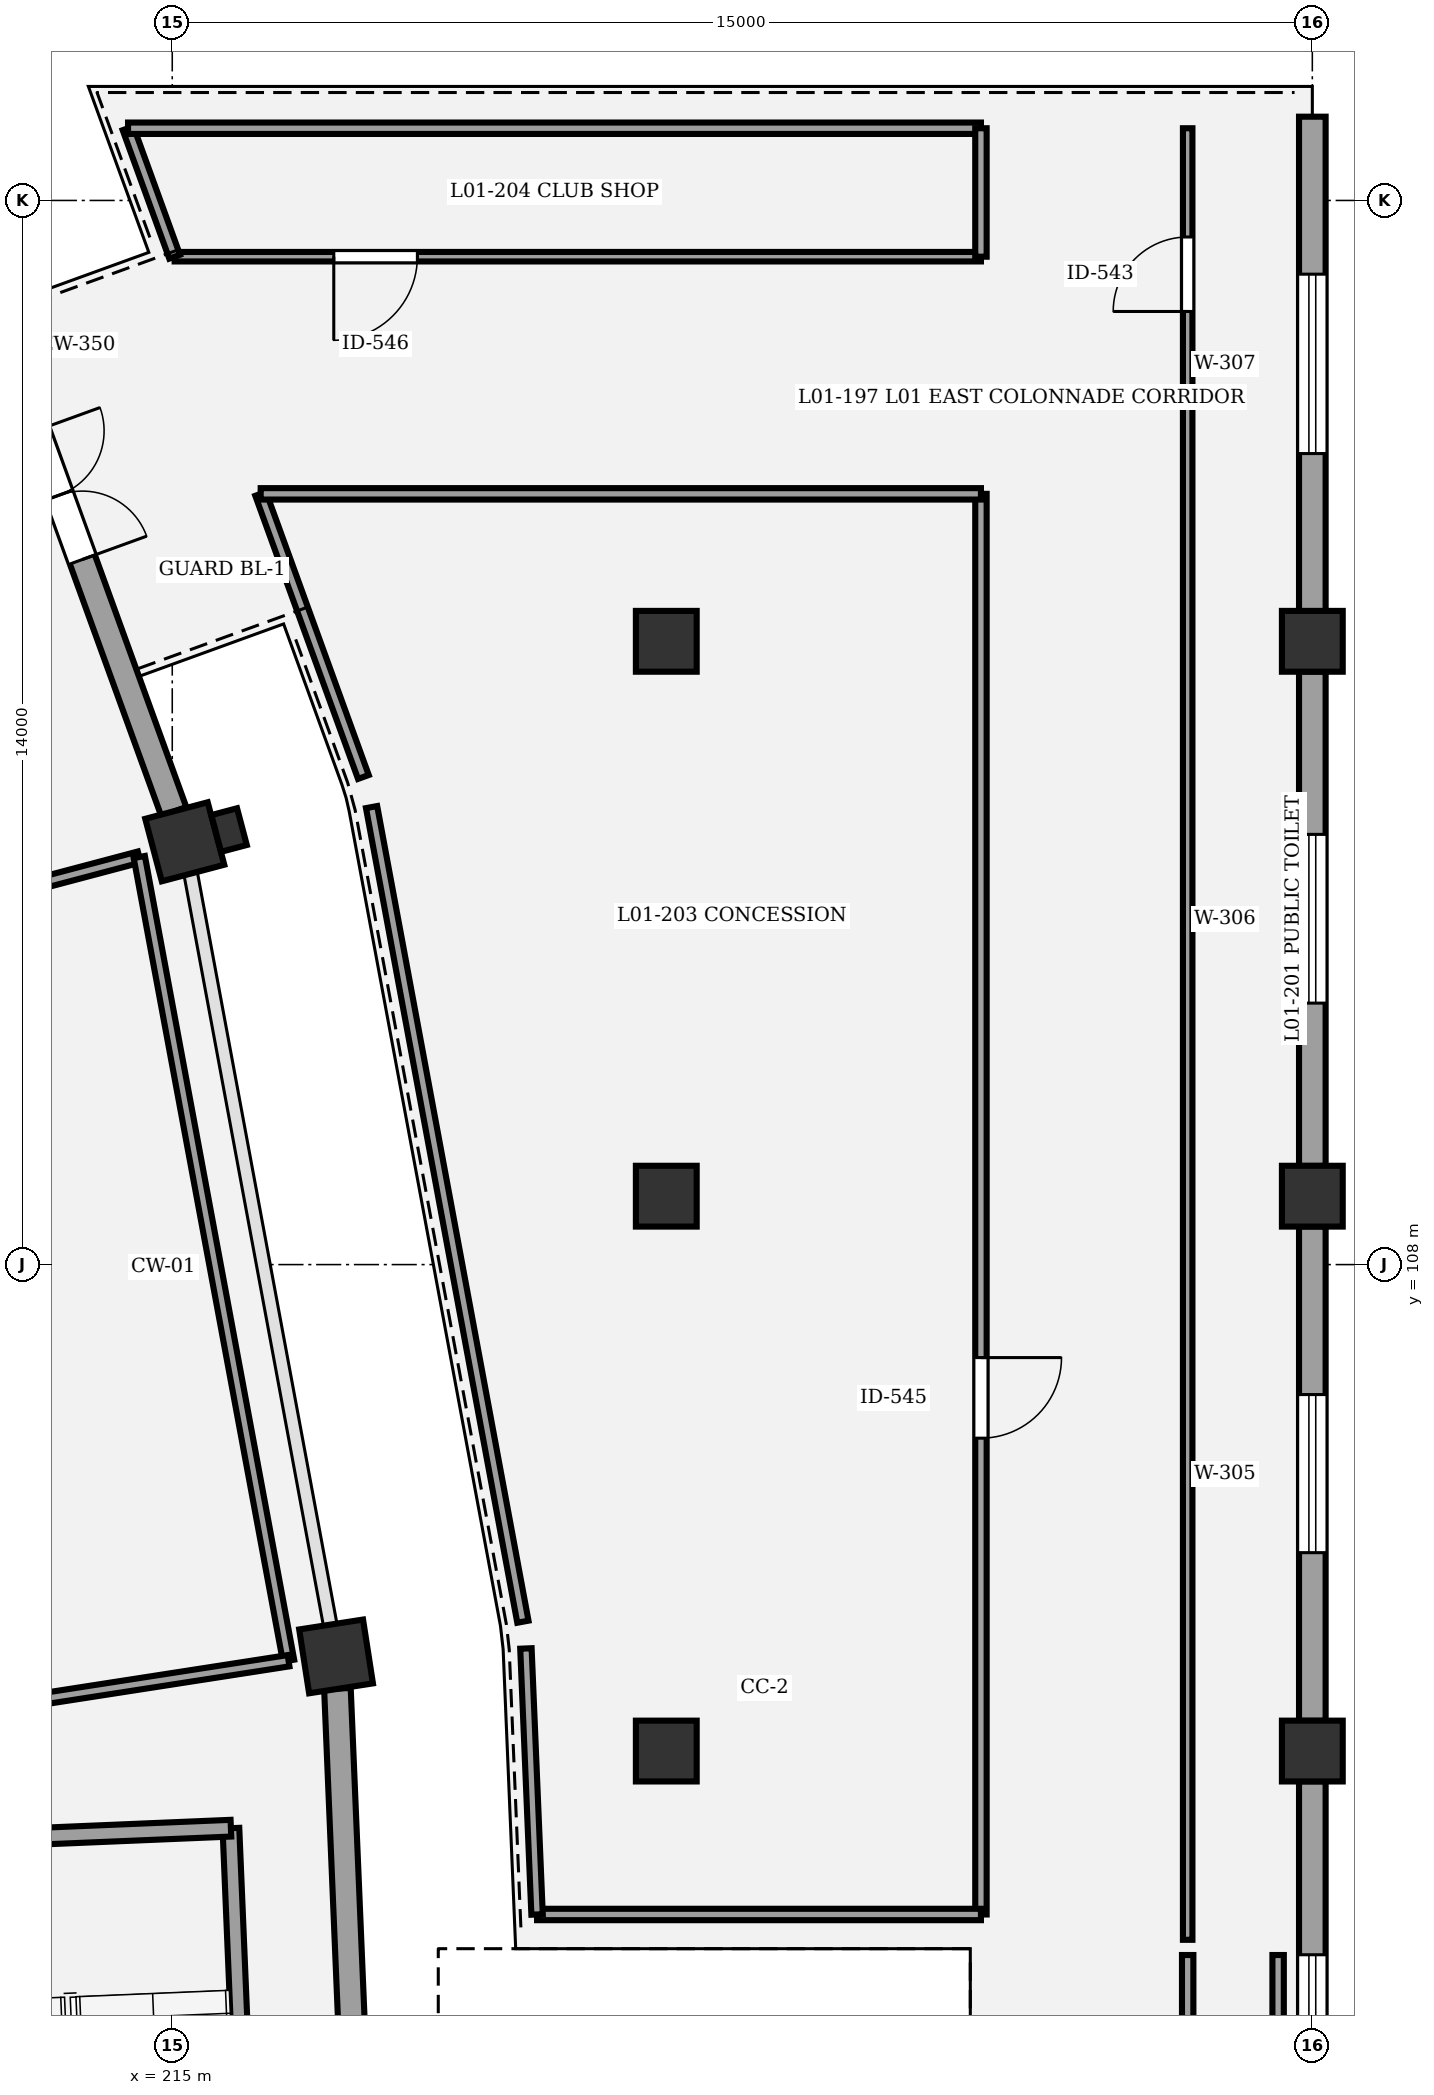
"""IFC4 building model, lengths in metres.
Left out: names, types, materials, properties, quantities, classifications, styles, units other than length and angle.
Written with IfcOpenShell. Run it as: python <this file> out.ifc"""

import sys

from ifc_helpers import new_model, si_unit, direction, frame, frame_2d, origin, origin_2d, place, context, subcontext, project, spatial, rectangle, circle, extrude, element, fill, save


model = new_model("IFC4")
c1 = context("Model", 3, precision=1e-05, world=origin(), true_north=direction((0.0, 1.0)))
c2 = subcontext(c1, "Body", "Model", "MODEL_VIEW")
j1 = project(units=[si_unit("LENGTHUNIT", "METRE"), si_unit("PLANEANGLEUNIT", "RADIAN")], contexts=[c1])
p1 = place(None, origin())
s1 = spatial("IfcSite", under=j1, at=p1, CompositionType="ELEMENT")
p2 = place(p1, origin())
s2 = spatial("IfcBuilding", under=s1, at=p2, CompositionType="ELEMENT")
p3 = place(p2, frame((0.0, 0.0, 5.4)))
s3 = spatial("IfcBuildingStorey", under=s2, at=p3, CompositionType="ELEMENT", Elevation=5.4)
for number, where, z_axis, x_axis in (
    (1, (217.156, 102.845, 0.0), (0.0, 0.0, 1.0), (0.988, 0.153, 0.0)),
    (2, (215.165, 113.562, 0.0), (0.0, 0.0, 1.0), (0.967, 0.256, 0.0)),
):
    element("IfcColumn", number, at=place(p3, frame(where, z_axis=z_axis, x_axis=x_axis)), inside=s3, PredefinedType="COLUMN", context=c2, shape_type="SweptSolid", body=[
        extrude(rectangle(XDim=0.85, YDim=0.85, at=origin_2d()), origin(), (0.0, 0.0, 1.0), 4.8),
    ])
p4 = place(p3, frame((215.748, 113.717, 0.0), z_axis=(0.0, 0.0, 1.0), x_axis=(-0.256289373133, 0.966600102017, 0.0)))
e3 = element("IfcColumn", 3, at=p4, inside=s3, PredefinedType="PILASTER", context=c2, shape_type="SweptSolid", body=[
    extrude(rectangle(XDim=0.5, YDim=0.35, at=origin_2d()), origin(), (0.0, 0.0, 1.0), 4.8),
])
for number, where, z_axis, x_axis in (
    (4, (221.5, 101.6, 0.0), (0.0, 0.0, 1.0), (1.0, 0.0, 0.0)),
    (5, (221.5, 108.9, 0.0), (0.0, 0.0, 1.0), (1.0, 0.0, 0.0)),
    (6, (221.5, 116.2, 0.0), (0.0, 0.0, 1.0), (1.0, 0.0, 0.0)),
    (7, (230.0, 101.6, 0.0), (0.0, 0.0, 1.0), (1.0, 0.0, 0.0)),
    (8, (230.0, 108.9, 0.0), (0.0, 0.0, 1.0), (1.0, 0.0, 0.0)),
    (9, (230.0, 116.2, 0.0), (0.0, 0.0, 1.0), (1.0, 0.0, 0.0)),
):
    element("IfcColumn", number, at=place(p3, frame(where, z_axis=z_axis, x_axis=x_axis)), inside=s3, PredefinedType="COLUMN", context=c2, shape_type="SweptSolid", body=[
        extrude(circle(Radius=0.4, at=origin_2d()), origin(), (0.0, 0.0, 1.0), 4.8),
    ])
p5 = place(p3, frame((217.802, 87.423, 0.0), z_axis=(0.0, 0.0, 1.0), x_axis=(-0.041907194538, 0.999121507649, 0.0)))
e10 = element("IfcWall", 10, at=p5, inside=s3, PredefinedType="STANDARD", context=c2, shape_type="SweptSolid", body=[
    extrude(rectangle(XDim=15.013, YDim=0.35, at=frame_2d((7.506, 0.0))), origin(), (0.0, 0.0, 1.0), 3.57),
])
p6 = place(p5, frame((6.247, 0.0, 0.9)))
e11 = element("IfcOpeningElement", 11, at=p6, cuts=e10, PredefinedType="OPENING", context=c2, shape_type="SweptSolid", body=[
    extrude(rectangle(XDim=2.52, YDim=1.55, at=frame_2d((1.26, 0.775))), frame((0.0, 0.185, 0.0), z_axis=(0.0, -1.0, 0.0), x_axis=(1.0, 0.0, 0.0)), (0.0, 0.0, 1.0), 0.37),
])
p7 = place(p3, frame((212.0, 122.285, 0.0), z_axis=(0.0, 0.0, 1.0), x_axis=(0.341014666885, -0.940057975324, 0.0)))
e12 = element("IfcWall", 12, at=p7, inside=s3, PredefinedType="STANDARD", context=c2, shape_type="SweptSolid", body=[
    extrude(rectangle(XDim=8.855, YDim=0.35, at=frame_2d((4.428, 0.0))), origin(), (0.0, 0.0, 1.0), 3.57),
])
p8 = place(p7, frame((3.528, 0.0, 0.0)))
e13 = element("IfcOpeningElement", 13, at=p8, cuts=e12, PredefinedType="OPENING", context=c2, shape_type="SweptSolid", body=[
    extrude(rectangle(XDim=1.8, YDim=2.4, at=frame_2d((0.9, 1.2))), frame((0.0, 0.185, 0.0), z_axis=(0.0, -1.0, 0.0), x_axis=(1.0, 0.0, 0.0)), (0.0, 0.0, 1.0), 0.37),
])
p9 = place(p3, frame((230.0, 101.202, 0.0), z_axis=(0.0, 0.0, 1.0), x_axis=(0.0, -1.0, 0.0)))
e14 = element("IfcWall", 14, at=p9, inside=s3, PredefinedType="STANDARD", context=c2, shape_type="SweptSolid", body=[
    extrude(rectangle(XDim=6.504, YDim=0.35, at=frame_2d((3.252, 0.0))), origin(), (0.0, 0.0, 1.0), 3.56),
])
p10 = place(p9, frame((2.282, 0.0, 0.9)))
e15 = element("IfcOpeningElement", 15, at=p10, cuts=e14, PredefinedType="OPENING", context=c2, shape_type="SweptSolid", body=[
    extrude(rectangle(XDim=1.94, YDim=2.15, at=frame_2d((0.97, 1.075))), frame((0.0, 0.185, 0.0), z_axis=(0.0, -1.0, 0.0), x_axis=(1.0, 0.0, 0.0)), (0.0, 0.0, 1.0), 0.37),
])
p11 = place(p3, frame((230.0, 108.502, 0.0), z_axis=(0.0, 0.0, 1.0), x_axis=(0.0, -1.0, 0.0)))
e16 = element("IfcWall", 16, at=p11, inside=s3, PredefinedType="STANDARD", context=c2, shape_type="SweptSolid", body=[
    extrude(rectangle(XDim=6.504, YDim=0.35, at=frame_2d((3.252, 0.0))), origin(), (0.0, 0.0, 1.0), 3.56),
])
p12 = place(p11, frame((2.212, 0.0, 0.9)))
e17 = element("IfcOpeningElement", 17, at=p12, cuts=e16, PredefinedType="OPENING", context=c2, shape_type="SweptSolid", body=[
    extrude(rectangle(XDim=2.08, YDim=2.15, at=frame_2d((1.04, 1.075))), frame((0.0, 0.185, 0.0), z_axis=(0.0, -1.0, 0.0), x_axis=(1.0, 0.0, 0.0)), (0.0, 0.0, 1.0), 0.37),
])
p13 = place(p3, frame((230.0, 115.802, 0.0), z_axis=(0.0, 0.0, 1.0), x_axis=(0.0, -1.0, 0.0)))
e18 = element("IfcWall", 18, at=p13, inside=s3, PredefinedType="STANDARD", context=c2, shape_type="SweptSolid", body=[
    extrude(rectangle(XDim=6.504, YDim=0.35, at=frame_2d((3.252, 0.0))), origin(), (0.0, 0.0, 1.0), 3.56),
])
p14 = place(p13, frame((2.142, 0.0, 0.9)))
e19 = element("IfcOpeningElement", 19, at=p14, cuts=e18, PredefinedType="OPENING", context=c2, shape_type="SweptSolid", body=[
    extrude(rectangle(XDim=2.22, YDim=2.15, at=frame_2d((1.11, 1.075))), frame((0.0, 0.185, 0.0), z_axis=(0.0, -1.0, 0.0), x_axis=(1.0, 0.0, 0.0)), (0.0, 0.0, 1.0), 0.37),
])
p15 = place(p3, frame((230.0, 123.102, 0.0), z_axis=(0.0, 0.0, 1.0), x_axis=(0.0, -1.0, 0.0)))
e20 = element("IfcWall", 20, at=p15, inside=s3, PredefinedType="STANDARD", context=c2, shape_type="SweptSolid", body=[
    extrude(rectangle(XDim=6.504, YDim=0.35, at=frame_2d((3.252, 0.0))), origin(), (0.0, 0.0, 1.0), 3.56),
])
p16 = place(p15, frame((2.072, 0.0, 0.9)))
e21 = element("IfcOpeningElement", 21, at=p16, cuts=e20, PredefinedType="OPENING", context=c2, shape_type="SweptSolid", body=[
    extrude(rectangle(XDim=2.36, YDim=2.15, at=frame_2d((1.18, 1.075))), frame((0.0, 0.185, 0.0), z_axis=(0.0, -1.0, 0.0), x_axis=(1.0, 0.0, 0.0)), (0.0, 0.0, 1.0), 0.37),
])
p17 = place(p3, frame((215.772, 100.585, 0.0), z_axis=(0.0, 0.0, 1.0), x_axis=(0.041871977473, -0.999122984173, 0.0)))
e22 = element("IfcWall", 22, at=p17, inside=s3, PredefinedType="SHEAR", context=c2, shape_type="SweptSolid", body=[
    extrude(rectangle(XDim=11.02, YDim=0.22, at=frame_2d((5.51, 0.0))), origin(), (0.0, 0.0, 1.0), 4.55),
])
p18 = place(p3, frame((211.365, 100.4, 0.0), z_axis=(0.0, 0.0, 1.0), x_axis=(0.999121521721, 0.041906859039, 0.0)))
e23 = element("IfcWall", 23, at=p18, inside=s3, PredefinedType="SHEAR", context=c2, shape_type="SweptSolid", body=[
    extrude(rectangle(XDim=4.41, YDim=0.22, at=frame_2d((2.205, 0.0))), origin(), (0.0, 0.0, 1.0), 4.55),
])
p19 = place(p3, frame((228.36, 75.083, 0.0), z_axis=(0.0, 0.0, 1.0), x_axis=(0.0, 1.0, 0.0)))
e24 = element("IfcWall", 24, at=p19, inside=s3, PredefinedType="PARTITIONING", context=c2, shape_type="SweptSolid", body=[
    extrude(rectangle(XDim=23.833, YDim=0.15, at=frame_2d((11.917, 0.0))), origin(), (0.0, 0.0, 1.0), 3.55),
])
p20 = place(p19, frame((8.109, 0.0, 0.0)))
e25 = element("IfcOpeningElement", 25, at=p20, cuts=e24, PredefinedType="OPENING", context=c2, shape_type="SweptSolid", body=[
    extrude(rectangle(XDim=0.94, YDim=2.1, at=frame_2d((0.47, 1.05))), frame((0.0, 0.085, 0.0), z_axis=(0.0, -1.0, 0.0), x_axis=(1.0, 0.0, 0.0)), (0.0, 0.0, 1.0), 0.17),
])
p21 = place(p3, frame((228.36, 99.117, 0.0), z_axis=(0.0, 0.0, 1.0), x_axis=(0.0, 1.0, 0.0)))
e26 = element("IfcWall", 26, at=p21, inside=s3, PredefinedType="PARTITIONING", context=c2, shape_type="SweptSolid", body=[
    extrude(rectangle(XDim=23.833, YDim=0.125, at=frame_2d((11.917, 0.0))), origin(), (0.0, 0.0, 1.0), 3.55),
])
p22 = place(p21, frame((21.423, 0.0, 0.0)))
e27 = element("IfcOpeningElement", 27, at=p22, cuts=e26, PredefinedType="OPENING", context=c2, shape_type="SweptSolid", body=[
    extrude(rectangle(XDim=0.98, YDim=2.1, at=frame_2d((0.49, 1.05))), frame((0.0, 0.073, 0.0), z_axis=(0.0, -1.0, 0.0), x_axis=(1.0, 0.0, 0.0)), (0.0, 0.0, 1.0), 0.145),
])
p23 = place(p3, frame((225.64, 118.14, 0.0), z_axis=(0.0, 0.0, 1.0), x_axis=(0.0, -1.0, 0.0)))
e28 = element("IfcWall", 28, at=p23, inside=s3, PredefinedType="PARTITIONING", context=c2, shape_type="SweptSolid", body=[
    extrude(rectangle(XDim=18.69, YDim=0.15, at=frame_2d((9.345, 0.0))), origin(), (0.0, 0.0, 1.0), 3.55),
])
p24 = place(p23, frame((11.364, 0.0, 0.0)))
e29 = element("IfcOpeningElement", 29, at=p24, cuts=e28, PredefinedType="OPENING", context=c2, shape_type="SweptSolid", body=[
    extrude(rectangle(XDim=1.06, YDim=2.1, at=frame_2d((0.53, 1.05))), frame((0.0, 0.085, 0.0), z_axis=(0.0, -1.0, 0.0), x_axis=(1.0, 0.0, 0.0)), (0.0, 0.0, 1.0), 0.17),
])
p25 = place(p3, frame((225.64, 121.26, 0.0), z_axis=(0.0, 0.0, 1.0), x_axis=(-1.0, 0.0, 0.0)))
e30 = element("IfcWall", 30, at=p25, inside=s3, PredefinedType="PARTITIONING", context=c2, shape_type="SweptSolid", body=[
    extrude(rectangle(XDim=10.608, YDim=0.125, at=frame_2d((5.304, 0.0))), origin(), (0.0, 0.0, 1.0), 3.55),
])
p26 = place(p25, frame((7.415, 0.0, 0.0)))
e31 = element("IfcOpeningElement", 31, at=p26, cuts=e30, PredefinedType="OPENING", context=c2, shape_type="SweptSolid", body=[
    extrude(rectangle(XDim=1.1, YDim=2.1, at=frame_2d((0.55, 1.05))), frame((0.0, 0.073, 0.0), z_axis=(0.0, -1.0, 0.0), x_axis=(1.0, 0.0, 0.0)), (0.0, 0.0, 1.0), 0.145),
])
p27 = place(p3, frame((206.895, 111.328, 0.0), z_axis=(0.0, 0.0, 1.0), x_axis=(0.966593450181, 0.25631445934, 0.0)))
e32 = element("IfcWall", 32, at=p27, inside=s3, PredefinedType="PARTITIONING", context=c2, shape_type="SweptSolid", body=[
    extrude(rectangle(XDim=7.936, YDim=0.15, at=frame_2d((3.968, 0.0))), origin(), (0.0, 0.0, 1.0), 3.55),
])
p28 = place(p3, frame((214.566, 113.362, 0.0), z_axis=(0.0, 0.0, 1.0), x_axis=(0.182607868301, -0.983185824976, 0.0)))
e33 = element("IfcWall", 33, at=p28, inside=s3, PredefinedType="PARTITIONING", context=c2, shape_type="SweptSolid", body=[
    extrude(rectangle(XDim=10.755, YDim=0.15, at=frame_2d((5.377, 0.0))), origin(), (0.0, 0.0, 1.0), 3.55),
])
p29 = place(p3, frame((216.53, 102.789, 0.0), z_axis=(0.0, 0.0, 1.0), x_axis=(-0.988185582016, -0.153262048451, 0.0)))
e34 = element("IfcWall", 34, at=p29, inside=s3, PredefinedType="PARTITIONING", context=c2, shape_type="SweptSolid", body=[
    extrude(rectangle(XDim=7.917, YDim=0.15, at=frame_2d((3.958, 0.0))), origin(), (0.0, 0.0, 1.0), 3.55),
])
p30 = place(p3, frame((229.55, 98.917, 0.0), z_axis=(0.0, 0.0, 1.0), x_axis=(0.0, -1.0, 0.0)))
e35 = element("IfcWall", 35, at=p30, inside=s3, PredefinedType="PARTITIONING", context=c2, shape_type="SweptSolid", body=[
    extrude(rectangle(XDim=23.833, YDim=0.15, at=frame_2d((11.917, 0.0))), origin(), (0.0, 0.0, 1.0), 3.55),
])
p31 = place(p3, frame((219.613, 103.302, 0.0), z_axis=(0.0, 0.0, 1.0), x_axis=(-0.182620957058, 0.983183393901, 0.0)))
e36 = element("IfcWall", 36, at=p31, inside=s3, PredefinedType="PARTITIONING", context=c2, shape_type="SweptSolid", body=[
    extrude(rectangle(XDim=10.901, YDim=0.15, at=frame_2d((5.45, 0.0))), origin(), (0.0, 0.0, 1.0), 3.55),
])
p32 = place(p3, frame((217.515, 114.415, 0.0), z_axis=(0.0, 0.0, 1.0), x_axis=(-0.341035525383, 0.94005040845, 0.0)))
e37 = element("IfcWall", 37, at=p32, inside=s3, PredefinedType="PARTITIONING", context=c2, shape_type="SweptSolid", body=[
    extrude(rectangle(XDim=3.962, YDim=0.15, at=frame_2d((1.981, 0.0))), origin(), (0.0, 0.0, 1.0), 3.55),
])
p33 = place(p3, frame((216.163, 118.14, 0.0), z_axis=(0.0, 0.0, 1.0), x_axis=(1.0, 0.0, 0.0)))
e38 = element("IfcWall", 38, at=p33, inside=s3, PredefinedType="PARTITIONING", context=c2, shape_type="SweptSolid", body=[
    extrude(rectangle(XDim=9.477, YDim=0.15, at=frame_2d((4.738, 0.0))), origin(), (0.0, 0.0, 1.0), 3.55),
])
p34 = place(p3, frame((225.64, 99.45, 0.0), z_axis=(0.0, 0.0, 1.0), x_axis=(-1.0, 0.0, 0.0)))
e39 = element("IfcWall", 39, at=p34, inside=s3, PredefinedType="PARTITIONING", context=c2, shape_type="SweptSolid", body=[
    extrude(rectangle(XDim=5.84, YDim=0.15, at=frame_2d((2.92, 0.0))), origin(), (0.0, 0.0, 1.0), 3.55),
])
p35 = place(p3, frame((219.8, 99.45, 0.0), z_axis=(0.0, 0.0, 1.0), x_axis=(-0.041888559174, 0.999122289117, 0.0)))
e40 = element("IfcWall", 40, at=p35, inside=s3, PredefinedType="PARTITIONING", context=c2, shape_type="SweptSolid", body=[
    extrude(rectangle(XDim=3.503, YDim=0.15, at=frame_2d((1.751, 0.0))), origin(), (0.0, 0.0, 1.0), 3.55),
])
p36 = place(p3, frame((215.031, 121.26, 0.0), z_axis=(0.0, 0.0, 1.0), x_axis=(-0.341012375502, 0.940058806541, 0.0)))
e41 = element("IfcWall", 41, at=p36, inside=s3, PredefinedType="PARTITIONING", context=c2, shape_type="SweptSolid", body=[
    extrude(rectangle(XDim=1.798, YDim=0.15, at=frame_2d((0.899, 0.0))), origin(), (0.0, 0.0, 1.0), 3.55),
])
p37 = place(p3, frame((214.418, 122.95, 0.0), z_axis=(0.0, 0.0, 1.0), x_axis=(1.0, 0.0, 0.0)))
e42 = element("IfcWall", 42, at=p37, inside=s3, PredefinedType="PARTITIONING", context=c2, shape_type="SweptSolid", body=[
    extrude(rectangle(XDim=11.221, YDim=0.15, at=frame_2d((5.611, 0.0))), origin(), (0.0, 0.0, 1.0), 3.55),
])
p38 = place(p3, frame((225.64, 122.95, 0.0), z_axis=(0.0, 0.0, 1.0), x_axis=(0.0, -1.0, 0.0)))
e43 = element("IfcWall", 43, at=p38, inside=s3, PredefinedType="PARTITIONING", context=c2, shape_type="SweptSolid", body=[
    extrude(rectangle(XDim=1.69, YDim=0.15, at=frame_2d((0.845, 0.0))), origin(), (0.0, 0.0, 1.0), 3.55),
])
p39 = place(p8, origin())
e44 = element("IfcDoor", 44, at=p39, inside=s3, OperationType="DOUBLE_DOOR_SINGLE_SWING", PredefinedType="DOOR", context=c2, shape_type="SweptSolid", body=[
    extrude(rectangle(XDim=1.8, YDim=2.4, at=frame_2d((0.9, 1.2))), frame((0.0, 0.025, 0.0), z_axis=(0.0, -1.0, 0.0), x_axis=(1.0, 0.0, 0.0)), (0.0, 0.0, 1.0), 0.05),
])
fill(e13, e44)
p40 = place(p10, origin())
e45 = element("IfcWindow", 45, at=p40, inside=s3, PartitioningType="SINGLE_PANEL", PredefinedType="WINDOW", context=c2, shape_type="SweptSolid", body=[
    extrude(rectangle(XDim=1.94, YDim=2.15, at=frame_2d((0.97, 1.075))), frame((0.0, 0.03, 0.0), z_axis=(0.0, -1.0, 0.0), x_axis=(1.0, 0.0, 0.0)), (0.0, 0.0, 1.0), 0.06),
])
fill(e15, e45)
p41 = place(p12, origin())
e46 = element("IfcWindow", 46, at=p41, inside=s3, PartitioningType="SINGLE_PANEL", PredefinedType="WINDOW", context=c2, shape_type="SweptSolid", body=[
    extrude(rectangle(XDim=2.08, YDim=2.15, at=frame_2d((1.04, 1.075))), frame((0.0, 0.03, 0.0), z_axis=(0.0, -1.0, 0.0), x_axis=(1.0, 0.0, 0.0)), (0.0, 0.0, 1.0), 0.06),
])
fill(e17, e46)
p42 = place(p14, origin())
e47 = element("IfcWindow", 47, at=p42, inside=s3, PartitioningType="SINGLE_PANEL", PredefinedType="WINDOW", context=c2, shape_type="SweptSolid", body=[
    extrude(rectangle(XDim=2.22, YDim=2.15, at=frame_2d((1.11, 1.075))), frame((0.0, 0.03, 0.0), z_axis=(0.0, -1.0, 0.0), x_axis=(1.0, 0.0, 0.0)), (0.0, 0.0, 1.0), 0.06),
])
fill(e19, e47)
p43 = place(p16, origin())
e48 = element("IfcWindow", 48, at=p43, inside=s3, PartitioningType="SINGLE_PANEL", PredefinedType="WINDOW", context=c2, shape_type="SweptSolid", body=[
    extrude(rectangle(XDim=2.36, YDim=2.15, at=frame_2d((1.18, 1.075))), frame((0.0, 0.03, 0.0), z_axis=(0.0, -1.0, 0.0), x_axis=(1.0, 0.0, 0.0)), (0.0, 0.0, 1.0), 0.06),
])
fill(e21, e48)
p44 = place(p22, origin())
e49 = element("IfcDoor", 49, at=p44, inside=s3, OperationType="SINGLE_SWING_LEFT", PredefinedType="DOOR", context=c2, shape_type="SweptSolid", body=[
    extrude(rectangle(XDim=0.98, YDim=2.1, at=frame_2d((0.49, 1.05))), frame((0.0, 0.025, 0.0), z_axis=(0.0, -1.0, 0.0), x_axis=(1.0, 0.0, 0.0)), (0.0, 0.0, 1.0), 0.05),
])
fill(e27, e49)
p45 = place(p24, origin())
e50 = element("IfcDoor", 50, at=p45, inside=s3, OperationType="SINGLE_SWING_LEFT", PredefinedType="DOOR", context=c2, shape_type="SweptSolid", body=[
    extrude(rectangle(XDim=1.06, YDim=2.1, at=frame_2d((0.53, 1.05))), frame((0.0, 0.025, 0.0), z_axis=(0.0, -1.0, 0.0), x_axis=(1.0, 0.0, 0.0)), (0.0, 0.0, 1.0), 0.05),
])
fill(e29, e50)
p46 = place(p26, origin())
e51 = element("IfcDoor", 51, at=p46, inside=s3, OperationType="SINGLE_SWING_RIGHT", PredefinedType="DOOR", context=c2, shape_type="SweptSolid", body=[
    extrude(rectangle(XDim=1.1, YDim=2.1, at=frame_2d((0.55, 1.05))), frame((0.0, 0.025, 0.0), z_axis=(0.0, -1.0, 0.0), x_axis=(1.0, 0.0, 0.0)), (0.0, 0.0, 1.0), 0.05),
])
fill(e31, e51)
save(model, sys.argv[1])
